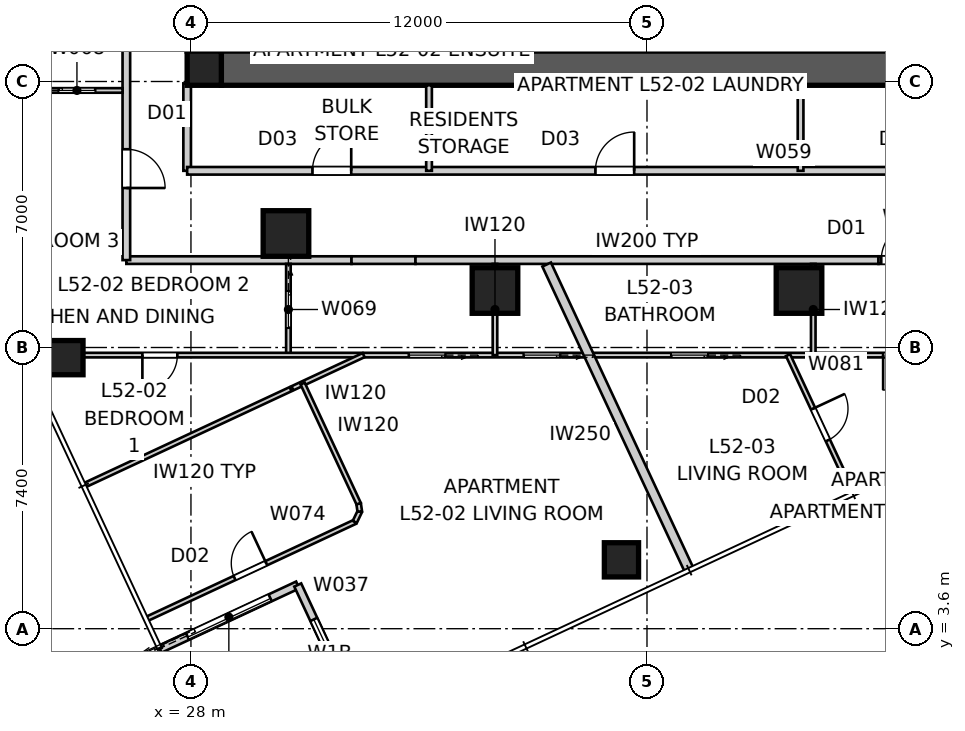
"""IFC4 building model, lengths in metres.
Left out: names, types, materials, properties, quantities, classifications, styles, units other than length and angle.
Written with IfcOpenShell. Run it as: python <this file> out.ifc"""

import sys

from ifc_helpers import new_model, si_unit, direction, frame, frame_2d, origin, origin_2d, place, context, subcontext, project, spatial, polyline, rectangle, outline, extrude, element, fill, save


model = new_model("IFC4")
c1 = context("Model", 3, precision=1e-05, world=origin(), true_north=direction((0.0, 1.0)))
c2 = subcontext(c1, "Body", "Model", "MODEL_VIEW")
j1 = project(units=[si_unit("LENGTHUNIT", "METRE"), si_unit("PLANEANGLEUNIT", "RADIAN")], contexts=[c1])
p1 = place(None, origin())
s1 = spatial("IfcSite", under=j1, at=p1, CompositionType="ELEMENT")
p2 = place(p1, origin())
s2 = spatial("IfcBuilding", under=s1, at=p2, CompositionType="ELEMENT")
p3 = place(p2, frame((0.0, 0.0, 189.6)))
s3 = spatial("IfcBuildingStorey", under=s2, at=p3, CompositionType="ELEMENT", Elevation=189.6)
p4 = place(p3, frame((51.2, 18.35, 0.0), z_axis=(0.0, 0.0, 1.0), x_axis=(-1.0, 0.0, 0.0)))
e1 = element("IfcWall", 1, at=p4, inside=s3, PredefinedType="SHEAR", context=c2, shape_type="SweptSolid", body=[
    extrude(outline(polyline([(0.0, -0.45), (22.4, -0.45), (22.4, -0.025), (22.85, -0.025), (22.85, 0.025), (22.4, 0.025), (22.4, 0.45), (0.0, 0.45), (0.0, 0.025), (-0.45, 0.025), (-0.45, -0.025), (0.0, -0.025), (0.0, -0.45)])), origin(), (0.0, 0.0, 1.0), 3.4),
])
p5 = place(p3, frame((28.35, 41.2, 0.0), z_axis=(0.0, 0.0, 1.0), x_axis=(0.0, -1.0, 0.0)))
e2 = element("IfcWall", 2, at=p5, inside=s3, PredefinedType="SHEAR", context=c2, shape_type="SweptSolid", body=[
    extrude(outline(polyline([(0.0, -0.45), (22.4, -0.45), (22.4, -0.025), (22.85, -0.025), (22.85, 0.025), (22.4, 0.025), (22.4, 0.45), (0.0, 0.45), (0.0, 0.025), (-0.45, 0.025), (-0.45, -0.025), (0.0, -0.025), (0.0, -0.45)])), origin(), (0.0, 0.0, 1.0), 3.4),
])
p6 = place(p5, frame((11.14, 0.0, 0.0)))
e3 = element("IfcOpeningElement", 3, at=p6, cuts=e2, PredefinedType="OPENING", context=c2, shape_type="SweptSolid", body=[
    extrude(rectangle(XDim=1.02, YDim=2.4, at=frame_2d((0.51, 1.2))), frame((0.0, 0.46, 0.0), z_axis=(0.0, -1.0, 0.0), x_axis=(1.0, 0.0, 0.0)), (0.0, 0.0, 1.0), 0.92),
])
for number, where, z_axis, x_axis in (
    (4, (28.35, 18.35, 0.0), (0.0, 0.0, 1.0), (1.0, 0.0, 0.0)),
    (5, (39.328, 5.412, 0.0), (0.0, 0.0, 1.0), (1.0, 0.0, 0.0)),
    (6, (24.71, 10.733, 0.0), (0.0, 0.0, 1.0), (1.0, 0.0, 0.0)),
):
    element("IfcColumn", number, at=place(p3, frame(where, z_axis=z_axis, x_axis=x_axis)), inside=s3, PredefinedType="COLUMN", context=c2, shape_type="SweptSolid", body=[
        extrude(rectangle(XDim=0.9, YDim=0.9, at=origin_2d()), origin(), (0.0, 0.0, 1.0), 3.4),
    ])
for number, where, z_axis, x_axis in (
    (7, (30.5, 14.0, 0.0), (0.0, 0.0, 1.0), (1.0, 0.0, 0.0)),
    (8, (36.0, 12.5, 0.0), (0.0, 0.0, 1.0), (1.0, 0.0, 0.0)),
    (9, (44.0, 12.5, 0.0), (0.0, 0.0, 1.0), (1.0, 0.0, 0.0)),
):
    element("IfcColumn", number, at=place(p3, frame(where, z_axis=z_axis, x_axis=x_axis)), inside=s3, PredefinedType="COLUMN", context=c2, shape_type="SweptSolid", body=[
        extrude(rectangle(XDim=1.2, YDim=1.2, at=origin_2d()), origin(), (0.0, 0.0, 1.0), 3.4),
    ])
p7 = place(p3, frame((27.185, 3.06, 0.0), z_axis=(0.0, 0.0, 1.0), x_axis=(0.906289140828, 0.422658246362, 0.0)))
e10 = element("IfcWall", 10, at=p7, inside=s3, PredefinedType="SOLIDWALL", context=c2, shape_type="SweptSolid", body=[
    extrude(rectangle(XDim=4.0, YDim=0.2, at=frame_2d((2.0, 0.0))), origin(), (0.0, 0.0, 1.0), 3.25),
])
p8 = place(p7, frame((0.8, 0.0, 0.0)))
e11 = element("IfcOpeningElement", 11, at=p8, cuts=e10, PredefinedType="OPENING", context=c2, shape_type="SweptSolid", body=[
    extrude(rectangle(XDim=2.4, YDim=2.1, at=frame_2d((1.2, 1.05))), frame((0.0, 0.11, 0.0), z_axis=(0.0, -1.0, 0.0), x_axis=(1.0, 0.0, 0.0)), (0.0, 0.0, 1.0), 0.22),
])
p9 = place(p3, frame((30.81, 4.75, 0.0), z_axis=(0.0, 0.0, 1.0), x_axis=(0.422658246362, -0.906289140828, 0.0)))
e12 = element("IfcWall", 12, at=p9, inside=s3, PredefinedType="SOLIDWALL", context=c2, shape_type="SweptSolid", body=[
    extrude(rectangle(XDim=4.0, YDim=0.2, at=frame_2d((2.0, 0.0))), origin(), (0.0, 0.0, 1.0), 3.25),
])
p10 = place(p9, frame((1.0, 0.0, 0.45)))
e13 = element("IfcOpeningElement", 13, at=p10, cuts=e12, PredefinedType="OPENING", context=c2, shape_type="SweptSolid", body=[
    extrude(rectangle(XDim=2.0, YDim=1.8, at=frame_2d((1.0, 0.9))), frame((0.0, 0.11, 0.0), z_axis=(0.0, -1.0, 0.0), x_axis=(1.0, 0.0, 0.0)), (0.0, 0.0, 1.0), 0.22),
])
p11 = place(p3, frame((26.3, 13.3, 0.0), z_axis=(0.0, 0.0, 1.0), x_axis=(1.0, 0.0, 0.0)))
e14 = element("IfcWall", 14, at=p11, inside=s3, PredefinedType="PARTITIONING", context=c2, shape_type="SweptSolid", body=[
    extrude(rectangle(XDim=5.925, YDim=0.2, at=frame_2d((2.962, 0.0))), origin(), (0.0, 0.0, 1.0), 3.25),
])
p12 = place(p3, frame((32.225, 13.3, 0.0), z_axis=(0.0, 0.0, 1.0), x_axis=(1.0, 0.0, 0.0)))
e15 = element("IfcWall", 15, at=p12, inside=s3, PredefinedType="PARTITIONING", context=c2, shape_type="SweptSolid", body=[
    extrude(rectangle(XDim=1.684, YDim=0.2, at=frame_2d((0.842, 0.0))), origin(), (0.0, 0.0, 1.0), 2.55),
])
p13 = place(p3, frame((33.908, 13.3, 0.0), z_axis=(0.0, 0.0, 1.0), x_axis=(1.0, 0.0, 0.0)))
e16 = element("IfcWall", 16, at=p13, inside=s3, PredefinedType="PARTITIONING", context=c2, shape_type="SweptSolid", body=[
    extrude(rectangle(XDim=12.183, YDim=0.2, at=frame_2d((6.092, 0.0))), origin(), (0.0, 0.0, 1.0), 3.25),
])
p14 = place(p3, frame((46.092, 13.3, 0.0), z_axis=(0.0, 0.0, 1.0), x_axis=(1.0, 0.0, 0.0)))
e17 = element("IfcWall", 17, at=p14, inside=s3, PredefinedType="PARTITIONING", context=c2, shape_type="SweptSolid", body=[
    extrude(rectangle(XDim=1.684, YDim=0.2, at=frame_2d((0.842, 0.0))), origin(), (0.0, 0.0, 1.0), 2.55),
])
p15 = place(p14, frame((0.073, 0.0, 0.0)))
e18 = element("IfcOpeningElement", 18, at=p15, cuts=e17, PredefinedType="OPENING", context=c2, shape_type="SweptSolid", body=[
    extrude(rectangle(XDim=1.02, YDim=2.34, at=frame_2d((0.51, 1.17))), frame((0.0, 0.11, 0.0), z_axis=(0.0, -1.0, 0.0), x_axis=(1.0, 0.0, 0.0)), (0.0, 0.0, 1.0), 0.22),
])
p16 = place(p3, frame((26.3, 47.1, 0.0), z_axis=(0.0, 0.0, 1.0), x_axis=(0.0, -1.0, 0.0)))
e19 = element("IfcWall", 19, at=p16, inside=s3, PredefinedType="PARTITIONING", context=c2, shape_type="SweptSolid", body=[
    extrude(rectangle(XDim=33.8, YDim=0.2, at=frame_2d((16.9, 0.0))), origin(), (0.0, 0.0, 1.0), 3.25),
])
p17 = place(p16, frame((15.449, 0.0, 0.0)))
e20 = element("IfcOpeningElement", 20, at=p17, cuts=e19, PredefinedType="OPENING", context=c2, shape_type="SweptSolid", body=[
    extrude(rectangle(XDim=1.02, YDim=2.34, at=frame_2d((0.51, 1.17))), frame((0.0, 0.11, 0.0), z_axis=(0.0, -1.0, 0.0), x_axis=(1.0, 0.0, 0.0)), (0.0, 0.0, 1.0), 0.22),
])
p18 = place(p16, frame((30.883, 0.0, 0.0)))
e21 = element("IfcOpeningElement", 21, at=p18, cuts=e19, PredefinedType="OPENING", context=c2, shape_type="SweptSolid", body=[
    extrude(rectangle(XDim=1.02, YDim=2.34, at=frame_2d((0.51, 1.17))), frame((0.0, 0.11, 0.0), z_axis=(0.0, -1.0, 0.0), x_axis=(1.0, 0.0, 0.0)), (0.0, 0.0, 1.0), 0.22),
])
p19 = place(p3, frame((41.11, 5.14, 0.0), z_axis=(0.0, 0.0, 1.0), x_axis=(-0.42262942879, 0.906302579672, 0.0)))
e22 = element("IfcWall", 22, at=p19, inside=s3, PredefinedType="PARTITIONING", context=c2, shape_type="SweptSolid", body=[
    extrude(rectangle(XDim=8.875, YDim=0.25, at=frame_2d((4.438, 0.0))), origin(), (0.0, 0.0, 1.0), 3.25),
])
p20 = place(p3, frame((27.9, 17.95, 0.0), z_axis=(0.0, 0.0, 1.0), x_axis=(0.0, -1.0, 0.0)))
e23 = element("IfcWall", 23, at=p20, inside=s3, PredefinedType="PARTITIONING", context=c2, shape_type="SweptSolid", body=[
    extrude(rectangle(XDim=2.3, YDim=0.2, at=frame_2d((1.15, 0.0))), origin(), (0.0, 0.0, 1.0), 3.25),
])
p21 = place(p3, frame((27.9, 15.65, 0.0), z_axis=(0.0, 0.0, 1.0), x_axis=(1.0, 0.0, 0.0)))
e24 = element("IfcWall", 24, at=p21, inside=s3, PredefinedType="PARTITIONING", context=c2, shape_type="SweptSolid", body=[
    extrude(rectangle(XDim=24.2, YDim=0.2, at=frame_2d((12.1, 0.0))), origin(), (0.0, 0.0, 1.0), 3.25),
])
p22 = place(p21, frame((10.743, 0.0, 0.0)))
e25 = element("IfcOpeningElement", 25, at=p22, cuts=e24, PredefinedType="OPENING", context=c2, shape_type="SweptSolid", body=[
    extrude(rectangle(XDim=1.02, YDim=2.1, at=frame_2d((0.51, 1.05))), frame((0.0, 0.11, 0.0), z_axis=(0.0, -1.0, 0.0), x_axis=(1.0, 0.0, 0.0)), (0.0, 0.0, 1.0), 0.22),
])
p23 = place(p21, frame((19.636, 0.0, 0.0)))
e26 = element("IfcOpeningElement", 26, at=p23, cuts=e24, PredefinedType="OPENING", context=c2, shape_type="SweptSolid", body=[
    extrude(rectangle(XDim=1.02, YDim=2.1, at=frame_2d((0.51, 1.05))), frame((0.0, 0.11, 0.0), z_axis=(0.0, -1.0, 0.0), x_axis=(1.0, 0.0, 0.0)), (0.0, 0.0, 1.0), 0.22),
])
p24 = place(p21, frame((3.297, 0.0, 0.0)))
e27 = element("IfcOpeningElement", 27, at=p24, cuts=e24, PredefinedType="OPENING", context=c2, shape_type="SweptSolid", body=[
    extrude(rectangle(XDim=1.02, YDim=2.1, at=frame_2d((0.51, 1.05))), frame((0.0, 0.11, 0.0), z_axis=(0.0, -1.0, 0.0), x_axis=(1.0, 0.0, 0.0)), (0.0, 0.0, 1.0), 0.22),
])
p25 = place(p3, frame((34.265, 15.65, 0.0), z_axis=(0.0, 0.0, 1.0), x_axis=(0.0, 1.0, 0.0)))
e28 = element("IfcWall", 28, at=p25, inside=s3, PredefinedType="SOLIDWALL", context=c2, shape_type="SweptSolid", body=[
    extrude(rectangle(XDim=2.25, YDim=0.15, at=frame_2d((1.125, 0.0))), origin(), (0.0, 0.0, 1.0), 2.796),
])
p26 = place(p3, frame((44.042, 15.65, 0.0), z_axis=(0.0, 0.0, 1.0), x_axis=(0.0, 1.0, 0.0)))
e29 = element("IfcWall", 29, at=p26, inside=s3, PredefinedType="SOLIDWALL", context=c2, shape_type="SweptSolid", body=[
    extrude(rectangle(XDim=2.25, YDim=0.15, at=frame_2d((1.125, 0.0))), origin(), (0.0, 0.0, 1.0), 3.25),
])
p27 = place(p3, frame((23.8, 17.765, 0.0), z_axis=(0.0, 0.0, 1.0), x_axis=(1.0, 0.0, 0.0)))
e30 = element("IfcWall", 30, at=p27, inside=s3, PredefinedType="PARTITIONING", context=c2, shape_type="SweptSolid", body=[
    extrude(rectangle(XDim=2.4, YDim=0.12, at=frame_2d((1.2, 0.0))), origin(), (0.0, 0.0, 1.0), 3.25),
])
p28 = place(p27, frame((0.72, 0.0, 0.0)))
e31 = element("IfcOpeningElement", 31, at=p28, cuts=e30, PredefinedType="OPENING", context=c2, shape_type="SweptSolid", body=[
    extrude(rectangle(XDim=0.96, YDim=2.1, at=frame_2d((0.48, 1.05))), frame((0.0, 0.07, 0.0), z_axis=(0.0, -1.0, 0.0), x_axis=(1.0, 0.0, 0.0)), (0.0, 0.0, 1.0), 0.14),
])
p29 = place(p3, frame((30.564, 13.2, 0.0), z_axis=(0.0, 0.0, 1.0), x_axis=(0.0, -1.0, 0.0)))
e32 = element("IfcWall", 32, at=p29, inside=s3, PredefinedType="PARTITIONING", context=c2, shape_type="SweptSolid", body=[
    extrude(rectangle(XDim=2.4, YDim=0.12, at=frame_2d((1.2, 0.0))), origin(), (0.0, 0.0, 1.0), 3.25),
])
p30 = place(p29, frame((0.72, 0.0, 0.0)))
e33 = element("IfcOpeningElement", 33, at=p30, cuts=e32, PredefinedType="OPENING", context=c2, shape_type="SweptSolid", body=[
    extrude(rectangle(XDim=0.96, YDim=2.1, at=frame_2d((0.48, 1.05))), frame((0.0, 0.07, 0.0), z_axis=(0.0, -1.0, 0.0), x_axis=(1.0, 0.0, 0.0)), (0.0, 0.0, 1.0), 0.14),
])
p31 = place(p3, frame((53.208, 10.8, 0.0), z_axis=(0.0, 0.0, 1.0), x_axis=(-1.0, 0.0, 0.0)))
e34 = element("IfcWall", 34, at=p31, inside=s3, PredefinedType="PARTITIONING", context=c2, shape_type="SweptSolid", body=[
    extrude(rectangle(XDim=29.593, YDim=0.12, at=frame_2d((14.796, 0.0))), origin(), (0.0, 0.0, 1.0), 3.25),
])
p32 = place(p31, frame((6.074, 0.0, 0.0)))
e35 = element("IfcOpeningElement", 35, at=p32, cuts=e34, PredefinedType="OPENING", context=c2, shape_type="SweptSolid", body=[
    extrude(rectangle(XDim=0.92, YDim=2.34, at=frame_2d((0.46, 1.17))), frame((0.0, 0.07, 0.0), z_axis=(0.0, -1.0, 0.0), x_axis=(1.0, 0.0, 0.0)), (0.0, 0.0, 1.0), 0.14),
])
p33 = place(p31, frame((25.566, 0.0, 0.0)))
e36 = element("IfcOpeningElement", 36, at=p33, cuts=e34, PredefinedType="OPENING", context=c2, shape_type="SweptSolid", body=[
    extrude(rectangle(XDim=0.92, YDim=2.34, at=frame_2d((0.46, 1.17))), frame((0.0, 0.07, 0.0), z_axis=(0.0, -1.0, 0.0), x_axis=(1.0, 0.0, 0.0)), (0.0, 0.0, 1.0), 0.14),
])
p34 = place(p31, frame((18.515, 0.0, 0.0)))
e37 = element("IfcOpeningElement", 37, at=p34, cuts=e34, PredefinedType="OPENING", context=c2, shape_type="SweptSolid", body=[
    extrude(rectangle(XDim=0.96, YDim=2.1, at=frame_2d((0.48, 1.05))), frame((0.0, 0.07, 0.0), z_axis=(0.0, -1.0, 0.0), x_axis=(1.0, 0.0, 0.0)), (0.0, 0.0, 1.0), 0.14),
])
p35 = place(p31, frame((15.493, 0.0, 0.0)))
e38 = element("IfcOpeningElement", 38, at=p35, cuts=e34, PredefinedType="OPENING", context=c2, shape_type="SweptSolid", body=[
    extrude(rectangle(XDim=0.96, YDim=2.1, at=frame_2d((0.48, 1.05))), frame((0.0, 0.07, 0.0), z_axis=(0.0, -1.0, 0.0), x_axis=(1.0, 0.0, 0.0)), (0.0, 0.0, 1.0), 0.14),
])
p36 = place(p31, frame((11.609, 0.0, 0.0)))
e39 = element("IfcOpeningElement", 39, at=p36, cuts=e34, PredefinedType="OPENING", context=c2, shape_type="SweptSolid", body=[
    extrude(rectangle(XDim=0.96, YDim=2.1, at=frame_2d((0.48, 1.05))), frame((0.0, 0.07, 0.0), z_axis=(0.0, -1.0, 0.0), x_axis=(1.0, 0.0, 0.0)), (0.0, 0.0, 1.0), 0.14),
])
p37 = place(p3, frame((36.0, 13.2, 0.0), z_axis=(0.0, 0.0, 1.0), x_axis=(0.0, -1.0, 0.0)))
e40 = element("IfcWall", 40, at=p37, inside=s3, PredefinedType="PARTITIONING", context=c2, shape_type="SweptSolid", body=[
    extrude(rectangle(XDim=2.4, YDim=0.12, at=frame_2d((1.2, 0.0))), origin(), (0.0, 0.0, 1.0), 3.25),
])
p38 = place(p3, frame((30.671, 9.927, 0.0), z_axis=(0.0, 0.0, 1.0), x_axis=(0.906306821634, 0.422620332048, 0.0)))
e41 = element("IfcWall", 41, at=p38, inside=s3, PredefinedType="PARTITIONING", context=c2, shape_type="SweptSolid", body=[
    extrude(rectangle(XDim=2.067, YDim=0.12, at=frame_2d((1.033, 0.0))), origin(), (0.0, 0.0, 1.0), 3.25),
])
p39 = place(p3, frame((26.854, 3.865, 0.0), z_axis=(0.0, 0.0, 1.0), x_axis=(0.906251488513, 0.422738973325, 0.0)))
e42 = element("IfcWall", 42, at=p39, inside=s3, PredefinedType="PARTITIONING", context=c2, shape_type="SweptSolid", body=[
    extrude(rectangle(XDim=6.022, YDim=0.12, at=frame_2d((3.011, 0.0))), origin(), (0.0, 0.0, 1.0), 3.25),
])
p40 = place(p39, frame((2.531, 0.0, 0.0)))
e43 = element("IfcOpeningElement", 43, at=p40, cuts=e42, PredefinedType="OPENING", context=c2, shape_type="SweptSolid", body=[
    extrude(rectangle(XDim=0.92, YDim=2.34, at=frame_2d((0.46, 1.17))), frame((0.0, 0.07, 0.0), z_axis=(0.0, -1.0, 0.0), x_axis=(1.0, 0.0, 0.0)), (0.0, 0.0, 1.0), 0.14),
])
p41 = place(p3, frame((32.311, 6.41, 0.0), z_axis=(0.0, 0.0, 1.0), x_axis=(0.432992694072, 0.901397430039, 0.0)))
e44 = element("IfcWall", 44, at=p41, inside=s3, PredefinedType="PARTITIONING", context=c2, shape_type="SweptSolid", body=[
    extrude(rectangle(XDim=0.303, YDim=0.12, at=frame_2d((0.152, 0.0))), origin(), (0.0, 0.0, 1.0), 3.25),
])
p42 = place(p3, frame((32.442, 6.684, 0.0), z_axis=(0.0, 0.0, 1.0), x_axis=(-0.1412579154, 0.989972828585, 0.0)))
e45 = element("IfcWall", 45, at=p42, inside=s3, PredefinedType="PARTITIONING", context=c2, shape_type="SweptSolid", body=[
    extrude(rectangle(XDim=0.209, YDim=0.12, at=frame_2d((0.104, 0.0))), origin(), (0.0, 0.0, 1.0), 3.25),
])
p43 = place(p3, frame((32.413, 6.891, 0.0), z_axis=(0.0, 0.0, 1.0), x_axis=(-0.422628673033, 0.906302932099, 0.0)))
e46 = element("IfcWall", 46, at=p43, inside=s3, PredefinedType="PARTITIONING", context=c2, shape_type="SweptSolid", body=[
    extrude(rectangle(XDim=3.487, YDim=0.12, at=frame_2d((1.744, 0.0))), origin(), (0.0, 0.0, 1.0), 3.25),
])
p44 = place(p3, frame((30.622, 9.904, 0.0), z_axis=(0.0, 0.0, 1.0), x_axis=(-0.906317929608, -0.422596510244, 0.0)))
e47 = element("IfcWall", 47, at=p44, inside=s3, PredefinedType="PARTITIONING", context=c2, shape_type="SweptSolid", body=[
    extrude(rectangle(XDim=5.967, YDim=0.12, at=frame_2d((2.984, 0.0))), origin(), (0.0, 0.0, 1.0), 3.25),
])
p45 = place(p3, frame((44.375, 10.8, 0.0), z_axis=(0.0, 0.0, 1.0), x_axis=(0.0, 1.0, 0.0)))
e48 = element("IfcWall", 48, at=p45, inside=s3, PredefinedType="PARTITIONING", context=c2, shape_type="SweptSolid", body=[
    extrude(rectangle(XDim=2.4, YDim=0.12, at=frame_2d((1.2, 0.0))), origin(), (0.0, 0.0, 1.0), 3.25),
])
p46 = place(p3, frame((43.712, 10.8, 0.0), z_axis=(0.0, 0.0, 1.0), x_axis=(0.422620823304, -0.906306592556, 0.0)))
e49 = element("IfcWall", 49, at=p46, inside=s3, PredefinedType="PARTITIONING", context=c2, shape_type="SweptSolid", body=[
    extrude(rectangle(XDim=3.99, YDim=0.12, at=frame_2d((1.995, 0.0))), origin(), (0.0, 0.0, 1.0), 3.25),
])
p47 = place(p46, frame((1.555, 0.0, 0.0)))
e50 = element("IfcOpeningElement", 50, at=p47, cuts=e49, PredefinedType="OPENING", context=c2, shape_type="SweptSolid", body=[
    extrude(rectangle(XDim=0.92, YDim=2.34, at=frame_2d((0.46, 1.17))), frame((0.0, 0.07, 0.0), z_axis=(0.0, -1.0, 0.0), x_axis=(1.0, 0.0, 0.0)), (0.0, 0.0, 1.0), 0.14),
])
p48 = place(p8, origin())
e51 = element("IfcDoor", 51, at=p48, inside=s3, OperationType="SLIDING_TO_LEFT", PredefinedType="DOOR", context=c2, shape_type="SweptSolid", body=[
    extrude(rectangle(XDim=2.4, YDim=2.1, at=frame_2d((1.2, 1.05))), frame((0.0, 0.025, 0.0), z_axis=(0.0, -1.0, 0.0), x_axis=(1.0, 0.0, 0.0)), (0.0, 0.0, 1.0), 0.05),
])
fill(e11, e51)
p49 = place(p10, origin())
e52 = element("IfcWindow", 52, at=p49, inside=s3, PartitioningType="SINGLE_PANEL", PredefinedType="WINDOW", context=c2, shape_type="SweptSolid", body=[
    extrude(rectangle(XDim=2.0, YDim=1.8, at=frame_2d((1.0, 0.9))), frame((0.0, 0.03, 0.0), z_axis=(0.0, -1.0, 0.0), x_axis=(1.0, 0.0, 0.0)), (0.0, 0.0, 1.0), 0.06),
])
fill(e13, e52)
p50 = place(p22, origin())
e53 = element("IfcDoor", 53, at=p50, inside=s3, OperationType="SINGLE_SWING_RIGHT", PredefinedType="DOOR", context=c2, shape_type="SweptSolid", body=[
    extrude(rectangle(XDim=1.02, YDim=2.1, at=frame_2d((0.51, 1.05))), frame((0.0, 0.025, 0.0), z_axis=(0.0, -1.0, 0.0), x_axis=(1.0, 0.0, 0.0)), (0.0, 0.0, 1.0), 0.05),
])
fill(e25, e53)
p51 = place(p24, origin())
e54 = element("IfcDoor", 54, at=p51, inside=s3, OperationType="SINGLE_SWING_RIGHT", PredefinedType="DOOR", context=c2, shape_type="SweptSolid", body=[
    extrude(rectangle(XDim=1.02, YDim=2.1, at=frame_2d((0.51, 1.05))), frame((0.0, 0.025, 0.0), z_axis=(0.0, -1.0, 0.0), x_axis=(1.0, 0.0, 0.0)), (0.0, 0.0, 1.0), 0.05),
])
fill(e27, e54)
p52 = place(p15, origin())
e55 = element("IfcDoor", 55, at=p52, inside=s3, OperationType="SINGLE_SWING_RIGHT", PredefinedType="DOOR", context=c2, shape_type="SweptSolid", body=[
    extrude(rectangle(XDim=1.02, YDim=2.34, at=frame_2d((0.51, 1.17))), frame((0.0, 0.025, 0.0), z_axis=(0.0, -1.0, 0.0), x_axis=(1.0, 0.0, 0.0)), (0.0, 0.0, 1.0), 0.05),
])
fill(e18, e55)
p53 = place(p18, origin())
e56 = element("IfcDoor", 56, at=p53, inside=s3, OperationType="SINGLE_SWING_RIGHT", PredefinedType="DOOR", context=c2, shape_type="SweptSolid", body=[
    extrude(rectangle(XDim=1.02, YDim=2.34, at=frame_2d((0.51, 1.17))), frame((0.0, 0.025, 0.0), z_axis=(0.0, -1.0, 0.0), x_axis=(1.0, 0.0, 0.0)), (0.0, 0.0, 1.0), 0.05),
])
fill(e21, e56)
p54 = place(p32, origin())
e57 = element("IfcDoor", 57, at=p54, inside=s3, OperationType="SINGLE_SWING_RIGHT", PredefinedType="DOOR", context=c2, shape_type="SweptSolid", body=[
    extrude(rectangle(XDim=0.92, YDim=2.34, at=frame_2d((0.46, 1.17))), frame((0.0, 0.025, 0.0), z_axis=(0.0, -1.0, 0.0), x_axis=(1.0, 0.0, 0.0)), (0.0, 0.0, 1.0), 0.05),
])
fill(e35, e57)
p55 = place(p33, origin())
e58 = element("IfcDoor", 58, at=p55, inside=s3, OperationType="SINGLE_SWING_RIGHT", PredefinedType="DOOR", context=c2, shape_type="SweptSolid", body=[
    extrude(rectangle(XDim=0.92, YDim=2.34, at=frame_2d((0.46, 1.17))), frame((0.0, 0.025, 0.0), z_axis=(0.0, -1.0, 0.0), x_axis=(1.0, 0.0, 0.0)), (0.0, 0.0, 1.0), 0.05),
])
fill(e36, e58)
p56 = place(p28, origin())
e59 = element("IfcDoor", 59, at=p56, inside=s3, OperationType="SLIDING_TO_LEFT", PredefinedType="DOOR", context=c2, shape_type="SweptSolid", body=[
    extrude(rectangle(XDim=0.96, YDim=2.1, at=frame_2d((0.48, 1.05))), frame((0.0, 0.025, 0.0), z_axis=(0.0, -1.0, 0.0), x_axis=(1.0, 0.0, 0.0)), (0.0, 0.0, 1.0), 0.05),
])
fill(e31, e59)
p57 = place(p30, origin())
e60 = element("IfcDoor", 60, at=p57, inside=s3, OperationType="SLIDING_TO_LEFT", PredefinedType="DOOR", context=c2, shape_type="SweptSolid", body=[
    extrude(rectangle(XDim=0.96, YDim=2.1, at=frame_2d((0.48, 1.05))), frame((0.0, 0.025, 0.0), z_axis=(0.0, -1.0, 0.0), x_axis=(1.0, 0.0, 0.0)), (0.0, 0.0, 1.0), 0.05),
])
fill(e33, e60)
p58 = place(p34, origin())
e61 = element("IfcDoor", 61, at=p58, inside=s3, OperationType="SLIDING_TO_LEFT", PredefinedType="DOOR", context=c2, shape_type="SweptSolid", body=[
    extrude(rectangle(XDim=0.96, YDim=2.1, at=frame_2d((0.48, 1.05))), frame((0.0, 0.025, 0.0), z_axis=(0.0, -1.0, 0.0), x_axis=(1.0, 0.0, 0.0)), (0.0, 0.0, 1.0), 0.05),
])
fill(e37, e61)
p59 = place(p40, origin())
e62 = element("IfcDoor", 62, at=p59, inside=s3, OperationType="SINGLE_SWING_RIGHT", PredefinedType="DOOR", context=c2, shape_type="SweptSolid", body=[
    extrude(rectangle(XDim=0.92, YDim=2.34, at=frame_2d((0.46, 1.17))), frame((0.0, 0.025, 0.0), z_axis=(0.0, -1.0, 0.0), x_axis=(1.0, 0.0, 0.0)), (0.0, 0.0, 1.0), 0.05),
])
fill(e43, e62)
p60 = place(p35, origin())
e63 = element("IfcDoor", 63, at=p60, inside=s3, OperationType="SLIDING_TO_LEFT", PredefinedType="DOOR", context=c2, shape_type="SweptSolid", body=[
    extrude(rectangle(XDim=0.96, YDim=2.1, at=frame_2d((0.48, 1.05))), frame((0.0, 0.025, 0.0), z_axis=(0.0, -1.0, 0.0), x_axis=(1.0, 0.0, 0.0)), (0.0, 0.0, 1.0), 0.05),
])
fill(e38, e63)
p61 = place(p47, origin())
e64 = element("IfcDoor", 64, at=p61, inside=s3, OperationType="SINGLE_SWING_LEFT", PredefinedType="DOOR", context=c2, shape_type="SweptSolid", body=[
    extrude(rectangle(XDim=0.92, YDim=2.34, at=frame_2d((0.46, 1.17))), frame((0.0, 0.025, 0.0), z_axis=(0.0, -1.0, 0.0), x_axis=(1.0, 0.0, 0.0)), (0.0, 0.0, 1.0), 0.05),
])
fill(e50, e64)
p62 = place(p36, origin())
e65 = element("IfcDoor", 65, at=p62, inside=s3, OperationType="SLIDING_TO_LEFT", PredefinedType="DOOR", context=c2, shape_type="SweptSolid", body=[
    extrude(rectangle(XDim=0.96, YDim=2.1, at=frame_2d((0.48, 1.05))), frame((0.0, 0.025, 0.0), z_axis=(0.0, -1.0, 0.0), x_axis=(1.0, 0.0, 0.0)), (0.0, 0.0, 1.0), 0.05),
])
fill(e39, e65)
save(model, sys.argv[1])
